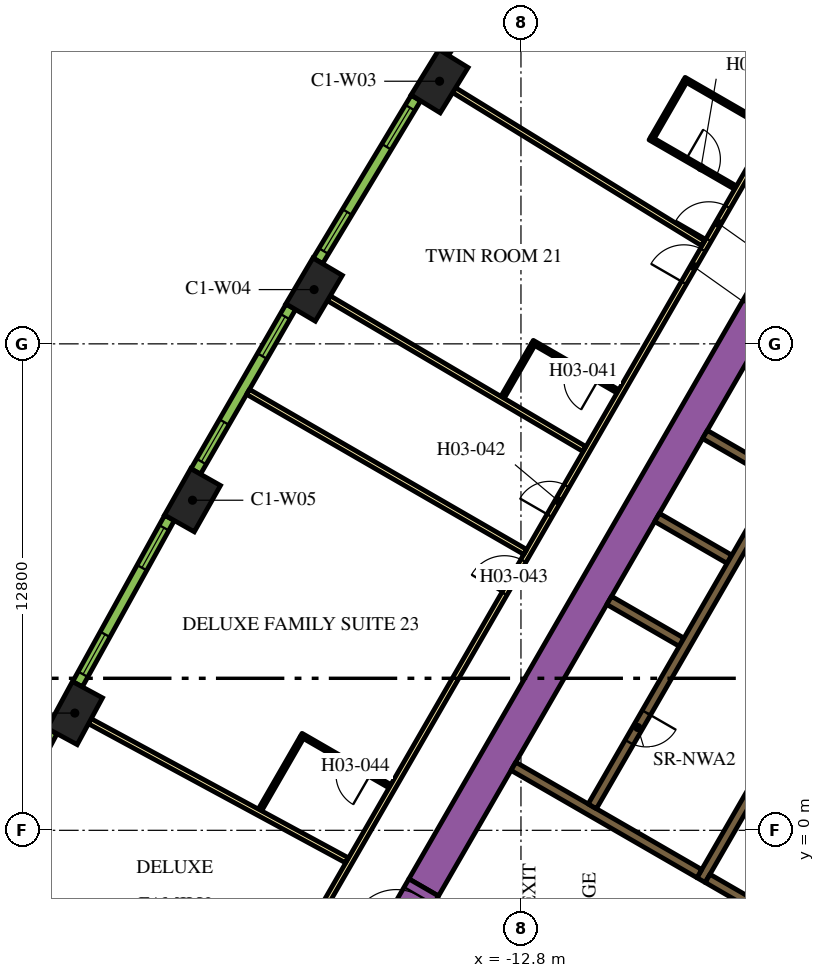
"""IFC4 building model, lengths in metres.
Left out: names, types, materials, properties, quantities, classifications, styles, units other than length and angle.
Written with IfcOpenShell. Run it as: python <this file> out.ifc"""

import sys

from ifc_helpers import new_model, si_unit, direction, frame, frame_2d, origin, origin_2d, place, context, subcontext, project, spatial, rectangle, extrude, element, fill, save


model = new_model("IFC4")
c1 = context("Model", 3, precision=1e-05, world=origin(), true_north=direction((0.0, 1.0)))
c2 = subcontext(c1, "Body", "Model", "MODEL_VIEW")
j1 = project(units=[si_unit("LENGTHUNIT", "METRE"), si_unit("PLANEANGLEUNIT", "RADIAN")], contexts=[c1])
p1 = place(None, origin())
s1 = spatial("IfcSite", under=j1, at=p1, CompositionType="ELEMENT")
p2 = place(p1, origin())
s2 = spatial("IfcBuilding", under=s1, at=p2, CompositionType="ELEMENT")
p3 = place(p2, frame((0.0, 0.0, 51.0)))
s3 = spatial("IfcBuildingStorey", under=s2, at=p3, CompositionType="ELEMENT", Elevation=51.0)
for number, where, z_axis, x_axis in (
    (1, (-14.942, 19.71, 0.0), (0.0, 0.0, 1.0), (-0.524, -0.852, 0.0)),
    (2, (-18.243, 14.228, 0.0), (0.0, 0.0, 1.0), (-0.508, -0.861, 0.0)),
    (3, (-21.443, 8.685, 0.0), (0.0, 0.0, 1.0), (-0.492, -0.871, 0.0)),
    (4, (-24.54, 3.085, 0.0), (0.0, 0.0, 1.0), (-0.476, -0.88, 0.0)),
):
    element("IfcColumn", number, at=place(p3, frame(where, z_axis=z_axis, x_axis=x_axis)), inside=s3, PredefinedType="COLUMN", context=c2, shape_type="SweptSolid", body=[
        extrude(rectangle(XDim=1.4, YDim=0.9, at=origin_2d()), origin(), (0.0, 0.0, 1.0), 3.9),
    ])
p4 = place(p3, frame((-15.36, -1.503, 0.0), z_axis=(0.0, 0.0, 1.0), x_axis=(0.50000389221, 0.866023156604, 0.0)))
e5 = element("IfcWall", 5, at=p4, inside=s3, PredefinedType="SOLIDWALL", context=c2, shape_type="SweptSolid", body=[
    extrude(rectangle(XDim=21.0, YDim=0.9, at=frame_2d((10.5, 0.0))), origin(), (0.0, 0.0, 1.0), 3.9),
])
p5 = place(p3, frame((-8.06, -1.311, 0.0), z_axis=(0.0, 0.0, 1.0), x_axis=(0.50000273126, 0.866023826885, 0.0)))
e6 = element("IfcWall", 6, at=p5, inside=s3, PredefinedType="SOLIDWALL", context=c2, shape_type="SweptSolid", body=[
    extrude(rectangle(XDim=10.33, YDim=0.25, at=frame_2d((5.165, 0.0))), origin(), (0.0, 0.0, 1.0), 3.9),
])
p6 = place(p3, frame((-7.889, -1.265, 0.0), z_axis=(0.0, 0.0, 1.0), x_axis=(0.865986741702, -0.500066958712, 0.0)))
e7 = element("IfcWall", 7, at=p6, inside=s3, PredefinedType="SOLIDWALL", context=c2, shape_type="SweptSolid", body=[
    extrude(rectangle(XDim=1.738, YDim=0.25, at=frame_2d((0.869, 0.0))), origin(), (0.0, 0.0, 1.0), 3.9),
])
p7 = place(p3, frame((-8.106, -1.14, 0.0), z_axis=(0.0, 0.0, 1.0), x_axis=(-0.866000643155, 0.500042884217, 0.0)))
e8 = element("IfcWall", 8, at=p7, inside=s3, PredefinedType="SOLIDWALL", context=c2, shape_type="SweptSolid", body=[
    extrude(rectangle(XDim=5.65, YDim=0.25, at=frame_2d((2.825, 0.0))), origin(), (0.0, 0.0, 1.0), 3.9),
])
for number, where, z_axis, x_axis in (
    (9, (-8.574, 4.95, 0.0), (0.0, 0.0, 1.0), (-0.866, 0.5, 0.0)),
    (10, (-7.314, 7.132, 0.0), (0.0, 0.0, 1.0), (-0.866, 0.5, 0.0)),
):
    element("IfcWall", number, at=place(p3, frame(where, z_axis=z_axis, x_axis=x_axis)), inside=s3, PredefinedType="SOLIDWALL", context=c2, shape_type="SweptSolid", body=[
        extrude(rectangle(XDim=2.2, YDim=0.25, at=frame_2d((1.1, 0.0))), origin(), (0.0, 0.0, 1.0), 3.9),
    ])
p8 = place(p3, frame((-6.296, 9.455, 0.0), z_axis=(0.0, 0.0, 1.0), x_axis=(-0.866011930837, 0.500023335103, 0.0)))
e11 = element("IfcWall", 11, at=p8, inside=s3, PredefinedType="SOLIDWALL", context=c2, shape_type="SweptSolid", body=[
    extrude(rectangle(XDim=1.92, YDim=0.25, at=frame_2d((0.96, 0.0))), origin(), (0.0, 0.0, 1.0), 3.9),
])
p9 = place(p3, frame((-6.008, 9.144, 0.0), z_axis=(0.0, 0.0, 1.0), x_axis=(-0.500006956611, -0.866021387346, 0.0)))
e12 = element("IfcWall", 12, at=p9, inside=s3, PredefinedType="SOLIDWALL", context=c2, shape_type="SweptSolid", body=[
    extrude(rectangle(XDim=9.83, YDim=0.25, at=frame_2d((4.915, 0.0))), origin(), (0.0, 0.0, 1.0), 3.9),
])
p10 = place(p9, frame((6.985, 0.0, 0.0)))
e13 = element("IfcOpeningElement", 13, at=p10, cuts=e12, PredefinedType="OPENING", context=c2, shape_type="SweptSolid", body=[
    extrude(rectangle(XDim=0.9, YDim=2.1, at=frame_2d((0.45, 1.05))), frame((0.0, 0.135, 0.0), z_axis=(0.0, -1.0, 0.0), x_axis=(1.0, 0.0, 0.0)), (0.0, 0.0, 1.0), 0.27),
])
p11 = place(p3, frame((-16.209, -2.976, 0.0), z_axis=(0.0, 0.0, 1.0), x_axis=(0.499954529098, 0.86605165483, 0.0)))
e14 = element("IfcWall", 14, at=p11, inside=s3, PredefinedType="SOLIDWALL", context=c2, shape_type="SweptSolid", body=[
    extrude(rectangle(XDim=1.7, YDim=0.9, at=frame_2d((0.85, 0.0))), origin(), (0.0, 0.0, 1.0), 3.9),
])
p12 = place(p11, frame((0.25, 0.0, 0.0)))
e15 = element("IfcOpeningElement", 15, at=p12, cuts=e14, PredefinedType="OPENING", context=c2, shape_type="SweptSolid", body=[
    extrude(rectangle(XDim=1.2, YDim=2.1, at=frame_2d((0.6, 1.05))), frame((0.0, 0.46, 0.0), z_axis=(0.0, -1.0, 0.0), x_axis=(1.0, 0.0, 0.0)), (0.0, 0.0, 1.0), 0.92),
])
p13 = place(p3, frame((-19.081, -3.9, 0.0), z_axis=(0.0, 0.0, 1.0), x_axis=(0.499998313975, 0.866026377209, 0.0)))
e16 = element("IfcWall", 16, at=p13, inside=s3, PredefinedType="PARTITIONING", context=c2, shape_type="SweptSolid", body=[
    extrude(rectangle(XDim=25.766, YDim=0.15, at=frame_2d((12.883, 0.0))), origin(), (0.0, 0.0, 1.0), 2.75),
])
p14 = place(p13, frame((22.445, 0.0, 0.0)))
e17 = element("IfcOpeningElement", 17, at=p14, cuts=e16, PredefinedType="OPENING", context=c2, shape_type="SweptSolid", body=[
    extrude(rectangle(XDim=1.0, YDim=2.1, at=frame_2d((0.5, 1.05))), frame((0.0, 0.085, 0.0), z_axis=(0.0, -1.0, 0.0), x_axis=(1.0, 0.0, 0.0)), (0.0, 0.0, 1.0), 0.17),
])
p15 = place(p13, frame((21.138, 0.0, 0.0)))
e18 = element("IfcOpeningElement", 18, at=p15, cuts=e16, PredefinedType="OPENING", context=c2, shape_type="SweptSolid", body=[
    extrude(rectangle(XDim=1.0, YDim=2.1, at=frame_2d((0.5, 1.05))), frame((0.0, 0.085, 0.0), z_axis=(0.0, -1.0, 0.0), x_axis=(1.0, 0.0, 0.0)), (0.0, 0.0, 1.0), 0.17),
])
p16 = place(p13, frame((14.066, 0.0, 0.0)))
e19 = element("IfcOpeningElement", 19, at=p16, cuts=e16, PredefinedType="OPENING", context=c2, shape_type="SweptSolid", body=[
    extrude(rectangle(XDim=0.9, YDim=2.1, at=frame_2d((0.45, 1.05))), frame((0.0, 0.085, 0.0), z_axis=(0.0, -1.0, 0.0), x_axis=(1.0, 0.0, 0.0)), (0.0, 0.0, 1.0), 0.17),
])
p17 = place(p13, frame((11.693, 0.0, 0.0)))
e20 = element("IfcOpeningElement", 20, at=p17, cuts=e16, PredefinedType="OPENING", context=c2, shape_type="SweptSolid", body=[
    extrude(rectangle(XDim=1.0, YDim=2.1, at=frame_2d((0.5, 1.05))), frame((0.0, 0.085, 0.0), z_axis=(0.0, -1.0, 0.0), x_axis=(1.0, 0.0, 0.0)), (0.0, 0.0, 1.0), 0.17),
])
p18 = place(p3, frame((-24.145, 2.871, 0.0), z_axis=(0.0, 0.0, 1.0), x_axis=(0.879551725039, -0.475803281809, 0.0)))
e21 = element("IfcWall", 21, at=p18, inside=s3, PredefinedType="PARTITIONING", context=c2, shape_type="SweptSolid", body=[
    extrude(rectangle(XDim=7.688, YDim=0.15, at=frame_2d((3.844, 0.0))), origin(), (0.0, 0.0, 1.0), 2.75),
])
p19 = place(p3, frame((-19.982, 11.537, 0.0), z_axis=(0.0, 0.0, 1.0), x_axis=(0.866020994654, -0.500007636761, 0.0)))
e22 = element("IfcWall", 22, at=p19, inside=s3, PredefinedType="PARTITIONING", context=c2, shape_type="SweptSolid", body=[
    extrude(rectangle(XDim=8.423, YDim=0.15, at=frame_2d((4.211, 0.0))), origin(), (0.0, 0.0, 1.0), 2.75),
])
p20 = place(p3, frame((-17.856, 13.999, 0.0), z_axis=(0.0, 0.0, 1.0), x_axis=(0.861371519381, -0.507975497047, 0.0)))
e23 = element("IfcWall", 23, at=p20, inside=s3, PredefinedType="PARTITIONING", context=c2, shape_type="SweptSolid", body=[
    extrude(rectangle(XDim=7.804, YDim=0.15, at=frame_2d((3.902, 0.0))), origin(), (0.0, 0.0, 1.0), 2.75),
])
p21 = place(p3, frame((-14.558, 19.475, 0.0), z_axis=(0.0, 0.0, 1.0), x_axis=(0.851829455142, -0.523819223925, 0.0)))
e24 = element("IfcWall", 24, at=p21, inside=s3, PredefinedType="PARTITIONING", context=c2, shape_type="SweptSolid", body=[
    extrude(rectangle(XDim=7.688, YDim=0.15, at=frame_2d((3.844, 0.0))), origin(), (0.0, 0.0, 1.0), 2.75),
])
p22 = place(p3, frame((-11.16, 24.888, 0.0), z_axis=(0.0, 0.0, 1.0), x_axis=(0.84199813156, -0.539480441211, 0.0)))
e25 = element("IfcWall", 25, at=p22, inside=s3, PredefinedType="PARTITIONING", context=c2, shape_type="SweptSolid", body=[
    extrude(rectangle(XDim=11.638, YDim=0.15, at=frame_2d((5.819, 0.0))), origin(), (0.0, 0.0, 1.0), 2.75),
])
p23 = place(p3, frame((-9.405, 18.21, 0.0), z_axis=(0.0, 0.0, 1.0), x_axis=(0.865997922154, -0.500047596559, 0.0)))
e26 = element("IfcWall", 26, at=p23, inside=s3, PredefinedType="PARTITIONING", context=c2, shape_type="SweptSolid", body=[
    extrude(rectangle(XDim=2.6, YDim=0.1, at=frame_2d((1.3, 0.0))), origin(), (0.0, 0.0, 1.0), 2.75),
])
p24 = place(p23, frame((1.1, 0.0, 0.0)))
e27 = element("IfcOpeningElement", 27, at=p24, cuts=e26, PredefinedType="OPENING", context=c2, shape_type="SweptSolid", body=[
    extrude(rectangle(XDim=0.9, YDim=2.1, at=frame_2d((0.45, 1.05))), frame((0.0, 0.06, 0.0), z_axis=(0.0, -1.0, 0.0), x_axis=(1.0, 0.0, 0.0)), (0.0, 0.0, 1.0), 0.12),
])
p25 = place(p3, frame((-9.336, 18.229, 0.0), z_axis=(0.0, 0.0, 1.0), x_axis=(0.499954529098, 0.86605165483, 0.0)))
e28 = element("IfcWall", 28, at=p25, inside=s3, PredefinedType="PARTITIONING", context=c2, shape_type="SweptSolid", body=[
    extrude(rectangle(XDim=1.7, YDim=0.1, at=frame_2d((0.85, 0.0))), origin(), (0.0, 0.0, 1.0), 2.75),
])
p26 = place(p3, frame((-6.253, 18.469, 0.0), z_axis=(0.0, 0.0, 1.0), x_axis=(-0.866021400173, 0.500006934395, 0.0)))
e29 = element("IfcWall", 29, at=p26, inside=s3, PredefinedType="PARTITIONING", context=c2, shape_type="SweptSolid", body=[
    extrude(rectangle(XDim=2.6, YDim=0.1, at=frame_2d((1.3, 0.0))), origin(), (0.0, 0.0, 1.0), 2.75),
])
p27 = place(p3, frame((-10.249, 11.549, 0.0), z_axis=(0.0, 0.0, 1.0), x_axis=(-0.866021400173, 0.500006934395, 0.0)))
e30 = element("IfcWall", 30, at=p27, inside=s3, PredefinedType="PARTITIONING", context=c2, shape_type="SweptSolid", body=[
    extrude(rectangle(XDim=2.6, YDim=0.1, at=frame_2d((1.3, 0.0))), origin(), (0.0, 0.0, 1.0), 2.75),
])
p28 = place(p27, frame((0.6, 0.0, 0.0)))
e31 = element("IfcOpeningElement", 31, at=p28, cuts=e30, PredefinedType="OPENING", context=c2, shape_type="SweptSolid", body=[
    extrude(rectangle(XDim=0.9, YDim=2.1, at=frame_2d((0.45, 1.05))), frame((0.0, 0.06, 0.0), z_axis=(0.0, -1.0, 0.0), x_axis=(1.0, 0.0, 0.0)), (0.0, 0.0, 1.0), 0.12),
])
p29 = place(p3, frame((-12.487, 12.772, 0.0), z_axis=(0.0, 0.0, 1.0), x_axis=(-0.500085729368, -0.865975902253, 0.0)))
e32 = element("IfcWall", 32, at=p29, inside=s3, PredefinedType="PARTITIONING", context=c2, shape_type="SweptSolid", body=[
    extrude(rectangle(XDim=1.59, YDim=0.1, at=frame_2d((0.795, 0.0))), origin(), (0.0, 0.0, 1.0), 2.75),
])
p30 = place(p3, frame((-16.247, 1.159, 0.0), z_axis=(0.0, 0.0, 1.0), x_axis=(-0.866059108428, 0.4999416173, 0.0)))
e33 = element("IfcWall", 33, at=p30, inside=s3, PredefinedType="PARTITIONING", context=c2, shape_type="SweptSolid", body=[
    extrude(rectangle(XDim=2.7, YDim=0.1, at=frame_2d((1.35, 0.0))), origin(), (0.0, 0.0, 1.0), 2.75),
])
p31 = place(p30, frame((0.6, 0.0, 0.0)))
e34 = element("IfcOpeningElement", 34, at=p31, cuts=e33, PredefinedType="OPENING", context=c2, shape_type="SweptSolid", body=[
    extrude(rectangle(XDim=0.9, YDim=2.1, at=frame_2d((0.45, 1.05))), frame((0.0, 0.06, 0.0), z_axis=(0.0, -1.0, 0.0), x_axis=(1.0, 0.0, 0.0)), (0.0, 0.0, 1.0), 0.12),
])
p32 = place(p3, frame((-18.567, 2.441, 0.0), z_axis=(0.0, 0.0, 1.0), x_axis=(-0.499946605688, -0.86605622881, 0.0)))
e35 = element("IfcWall", 35, at=p32, inside=s3, PredefinedType="PARTITIONING", context=c2, shape_type="SweptSolid", body=[
    extrude(rectangle(XDim=2.2, YDim=0.1, at=frame_2d((1.1, 0.0))), origin(), (0.0, 0.0, 1.0), 2.75),
])
p33 = place(p3, frame((-12.17, 24.699, 0.0), z_axis=(0.0, 0.0, 1.0), x_axis=(-0.531688286542, -0.846940119462, 0.0)))
e36 = element("IfcWall", 36, at=p33, inside=s3, PredefinedType="SOLIDWALL", context=c2, shape_type="SweptSolid", body=[
    extrude(rectangle(XDim=4.998, YDim=0.29, at=frame_2d((2.499, 0.0))), origin(), (0.0, 0.0, 1.0), 3.65),
])
p34 = place(p33, frame((0.297, 0.0, 0.9)))
e37 = element("IfcOpeningElement", 37, at=p34, cuts=e36, PredefinedType="OPENING", context=c2, shape_type="SweptSolid", body=[
    extrude(rectangle(XDim=1.2, YDim=2.15, at=frame_2d((0.6, 1.075))), frame((0.0, 0.155, 0.0), z_axis=(0.0, -1.0, 0.0), x_axis=(1.0, 0.0, 0.0)), (0.0, 0.0, 1.0), 0.31),
])
p35 = place(p33, frame((3.501, 0.0, 0.9)))
e38 = element("IfcOpeningElement", 38, at=p35, cuts=e36, PredefinedType="OPENING", context=c2, shape_type="SweptSolid", body=[
    extrude(rectangle(XDim=1.2, YDim=2.15, at=frame_2d((0.6, 1.075))), frame((0.0, 0.155, 0.0), z_axis=(0.0, -1.0, 0.0), x_axis=(1.0, 0.0, 0.0)), (0.0, 0.0, 1.0), 0.31),
])
p36 = place(p3, frame((-15.564, 19.267, 0.0), z_axis=(0.0, 0.0, 1.0), x_axis=(-0.515938796285, -0.856625448191, 0.0)))
e39 = element("IfcWall", 39, at=p36, inside=s3, PredefinedType="SOLIDWALL", context=c2, shape_type="SweptSolid", body=[
    extrude(rectangle(XDim=4.998, YDim=0.29, at=frame_2d((2.499, 0.0))), origin(), (0.0, 0.0, 1.0), 3.65),
])
p37 = place(p36, frame((0.297, 0.0, 0.9)))
e40 = element("IfcOpeningElement", 40, at=p37, cuts=e39, PredefinedType="OPENING", context=c2, shape_type="SweptSolid", body=[
    extrude(rectangle(XDim=1.2, YDim=2.15, at=frame_2d((0.6, 1.075))), frame((0.0, 0.155, 0.0), z_axis=(0.0, -1.0, 0.0), x_axis=(1.0, 0.0, 0.0)), (0.0, 0.0, 1.0), 0.31),
])
p38 = place(p36, frame((3.501, 0.0, 0.9)))
e41 = element("IfcOpeningElement", 41, at=p38, cuts=e39, PredefinedType="OPENING", context=c2, shape_type="SweptSolid", body=[
    extrude(rectangle(XDim=1.2, YDim=2.15, at=frame_2d((0.6, 1.075))), frame((0.0, 0.155, 0.0), z_axis=(0.0, -1.0, 0.0), x_axis=(1.0, 0.0, 0.0)), (0.0, 0.0, 1.0), 0.31),
])
p39 = place(p3, frame((-18.858, 13.773, 0.0), z_axis=(0.0, 0.0, 1.0), x_axis=(-0.50002123722, -0.866013142123, 0.0)))
e42 = element("IfcWall", 42, at=p39, inside=s3, PredefinedType="SOLIDWALL", context=c2, shape_type="SweptSolid", body=[
    extrude(rectangle(XDim=4.998, YDim=0.29, at=frame_2d((2.499, 0.0))), origin(), (0.0, 0.0, 1.0), 3.65),
])
p40 = place(p39, frame((0.297, 0.0, 0.9)))
e43 = element("IfcOpeningElement", 43, at=p40, cuts=e42, PredefinedType="OPENING", context=c2, shape_type="SweptSolid", body=[
    extrude(rectangle(XDim=1.2, YDim=2.15, at=frame_2d((0.6, 1.075))), frame((0.0, 0.155, 0.0), z_axis=(0.0, -1.0, 0.0), x_axis=(1.0, 0.0, 0.0)), (0.0, 0.0, 1.0), 0.31),
])
p41 = place(p39, frame((3.501, 0.0, 0.9)))
e44 = element("IfcOpeningElement", 44, at=p41, cuts=e42, PredefinedType="OPENING", context=c2, shape_type="SweptSolid", body=[
    extrude(rectangle(XDim=1.2, YDim=2.15, at=frame_2d((0.6, 1.075))), frame((0.0, 0.155, 0.0), z_axis=(0.0, -1.0, 0.0), x_axis=(1.0, 0.0, 0.0)), (0.0, 0.0, 1.0), 0.31),
])
p42 = place(p3, frame((-22.05, 8.22, 0.0), z_axis=(0.0, 0.0, 1.0), x_axis=(-0.483912572871, -0.875116347589, 0.0)))
e45 = element("IfcWall", 45, at=p42, inside=s3, PredefinedType="SOLIDWALL", context=c2, shape_type="SweptSolid", body=[
    extrude(rectangle(XDim=4.998, YDim=0.29, at=frame_2d((2.499, 0.0))), origin(), (0.0, 0.0, 1.0), 3.65),
])
p43 = place(p42, frame((0.297, 0.0, 0.9)))
e46 = element("IfcOpeningElement", 46, at=p43, cuts=e45, PredefinedType="OPENING", context=c2, shape_type="SweptSolid", body=[
    extrude(rectangle(XDim=1.2, YDim=2.15, at=frame_2d((0.6, 1.075))), frame((0.0, 0.155, 0.0), z_axis=(0.0, -1.0, 0.0), x_axis=(1.0, 0.0, 0.0)), (0.0, 0.0, 1.0), 0.31),
])
p44 = place(p42, frame((3.501, 0.0, 0.9)))
e47 = element("IfcOpeningElement", 47, at=p44, cuts=e45, PredefinedType="OPENING", context=c2, shape_type="SweptSolid", body=[
    extrude(rectangle(XDim=1.2, YDim=2.15, at=frame_2d((0.6, 1.075))), frame((0.0, 0.155, 0.0), z_axis=(0.0, -1.0, 0.0), x_axis=(1.0, 0.0, 0.0)), (0.0, 0.0, 1.0), 0.31),
])
p45 = place(p3, frame((-25.138, 2.608, 0.0), z_axis=(0.0, 0.0, 1.0), x_axis=(-0.467629620899, -0.883924509026, 0.0)))
e48 = element("IfcWall", 48, at=p45, inside=s3, PredefinedType="SOLIDWALL", context=c2, shape_type="SweptSolid", body=[
    extrude(rectangle(XDim=4.998, YDim=0.29, at=frame_2d((2.499, 0.0))), origin(), (0.0, 0.0, 1.0), 3.65),
])
p46 = place(p45, frame((0.297, 0.0, 0.9)))
e49 = element("IfcOpeningElement", 49, at=p46, cuts=e48, PredefinedType="OPENING", context=c2, shape_type="SweptSolid", body=[
    extrude(rectangle(XDim=1.2, YDim=2.15, at=frame_2d((0.6, 1.075))), frame((0.0, 0.155, 0.0), z_axis=(0.0, -1.0, 0.0), x_axis=(1.0, 0.0, 0.0)), (0.0, 0.0, 1.0), 0.31),
])
p47 = place(p45, frame((3.501, 0.0, 0.9)))
e50 = element("IfcOpeningElement", 50, at=p47, cuts=e48, PredefinedType="OPENING", context=c2, shape_type="SweptSolid", body=[
    extrude(rectangle(XDim=1.2, YDim=2.15, at=frame_2d((0.6, 1.075))), frame((0.0, 0.155, 0.0), z_axis=(0.0, -1.0, 0.0), x_axis=(1.0, 0.0, 0.0)), (0.0, 0.0, 1.0), 0.31),
])
p48 = place(p10, origin())
e51 = element("IfcDoor", 51, at=p48, inside=s3, OperationType="SINGLE_SWING_LEFT", PredefinedType="DOOR", context=c2, shape_type="SweptSolid", body=[
    extrude(rectangle(XDim=0.9, YDim=2.1, at=frame_2d((0.45, 1.05))), frame((0.0, 0.025, 0.0), z_axis=(0.0, -1.0, 0.0), x_axis=(1.0, 0.0, 0.0)), (0.0, 0.0, 1.0), 0.05),
])
fill(e13, e51)
p49 = place(p12, origin())
e52 = element("IfcDoor", 52, at=p49, inside=s3, OperationType="SINGLE_SWING_LEFT", PredefinedType="DOOR", context=c2, shape_type="SweptSolid", body=[
    extrude(rectangle(XDim=1.2, YDim=2.1, at=frame_2d((0.6, 1.05))), frame((0.0, 0.025, 0.0), z_axis=(0.0, -1.0, 0.0), x_axis=(1.0, 0.0, 0.0)), (0.0, 0.0, 1.0), 0.05),
])
fill(e15, e52)
p50 = place(p14, origin())
e53 = element("IfcDoor", 53, at=p50, inside=s3, OperationType="SINGLE_SWING_LEFT", PredefinedType="DOOR", context=c2, shape_type="SweptSolid", body=[
    extrude(rectangle(XDim=1.0, YDim=2.1, at=frame_2d((0.5, 1.05))), frame((0.0, 0.025, 0.0), z_axis=(0.0, -1.0, 0.0), x_axis=(1.0, 0.0, 0.0)), (0.0, 0.0, 1.0), 0.05),
])
fill(e17, e53)
p51 = place(p24, origin())
e54 = element("IfcDoor", 54, at=p51, inside=s3, OperationType="SINGLE_SWING_LEFT", PredefinedType="DOOR", context=c2, shape_type="SweptSolid", body=[
    extrude(rectangle(XDim=0.9, YDim=2.1, at=frame_2d((0.45, 1.05))), frame((0.0, 0.025, 0.0), z_axis=(0.0, -1.0, 0.0), x_axis=(1.0, 0.0, 0.0)), (0.0, 0.0, 1.0), 0.05),
])
fill(e27, e54)
p52 = place(p15, origin())
e55 = element("IfcDoor", 55, at=p52, inside=s3, OperationType="SINGLE_SWING_RIGHT", PredefinedType="DOOR", context=c2, shape_type="SweptSolid", body=[
    extrude(rectangle(XDim=1.0, YDim=2.1, at=frame_2d((0.5, 1.05))), frame((0.0, 0.025, 0.0), z_axis=(0.0, -1.0, 0.0), x_axis=(1.0, 0.0, 0.0)), (0.0, 0.0, 1.0), 0.05),
])
fill(e18, e55)
p53 = place(p28, origin())
e56 = element("IfcDoor", 56, at=p53, inside=s3, OperationType="SINGLE_SWING_RIGHT", PredefinedType="DOOR", context=c2, shape_type="SweptSolid", body=[
    extrude(rectangle(XDim=0.9, YDim=2.1, at=frame_2d((0.45, 1.05))), frame((0.0, 0.025, 0.0), z_axis=(0.0, -1.0, 0.0), x_axis=(1.0, 0.0, 0.0)), (0.0, 0.0, 1.0), 0.05),
])
fill(e31, e56)
p54 = place(p16, origin())
e57 = element("IfcDoor", 57, at=p54, inside=s3, OperationType="SINGLE_SWING_RIGHT", PredefinedType="DOOR", context=c2, shape_type="SweptSolid", body=[
    extrude(rectangle(XDim=0.9, YDim=2.1, at=frame_2d((0.45, 1.05))), frame((0.0, 0.025, 0.0), z_axis=(0.0, -1.0, 0.0), x_axis=(1.0, 0.0, 0.0)), (0.0, 0.0, 1.0), 0.05),
])
fill(e19, e57)
p55 = place(p17, origin())
e58 = element("IfcDoor", 58, at=p55, inside=s3, OperationType="SINGLE_SWING_RIGHT", PredefinedType="DOOR", context=c2, shape_type="SweptSolid", body=[
    extrude(rectangle(XDim=1.0, YDim=2.1, at=frame_2d((0.5, 1.05))), frame((0.0, 0.025, 0.0), z_axis=(0.0, -1.0, 0.0), x_axis=(1.0, 0.0, 0.0)), (0.0, 0.0, 1.0), 0.05),
])
fill(e20, e58)
p56 = place(p31, origin())
e59 = element("IfcDoor", 59, at=p56, inside=s3, OperationType="SINGLE_SWING_LEFT", PredefinedType="DOOR", context=c2, shape_type="SweptSolid", body=[
    extrude(rectangle(XDim=0.9, YDim=2.1, at=frame_2d((0.45, 1.05))), frame((0.0, 0.025, 0.0), z_axis=(0.0, -1.0, 0.0), x_axis=(1.0, 0.0, 0.0)), (0.0, 0.0, 1.0), 0.05),
])
fill(e34, e59)
p57 = place(p37, origin())
e60 = element("IfcWindow", 60, at=p57, inside=s3, PartitioningType="DOUBLE_PANEL_VERTICAL", PredefinedType="WINDOW", context=c2, shape_type="SweptSolid", body=[
    extrude(rectangle(XDim=1.2, YDim=2.15, at=frame_2d((0.6, 1.075))), frame((0.0, 0.015, 0.0), z_axis=(0.0, -1.0, 0.0), x_axis=(1.0, 0.0, 0.0)), (0.0, 0.0, 1.0), 0.06),
])
fill(e40, e60)
p58 = place(p38, origin())
e61 = element("IfcWindow", 61, at=p58, inside=s3, PartitioningType="DOUBLE_PANEL_VERTICAL", PredefinedType="WINDOW", context=c2, shape_type="SweptSolid", body=[
    extrude(rectangle(XDim=1.2, YDim=2.15, at=frame_2d((0.6, 1.075))), frame((0.0, 0.015, 0.0), z_axis=(0.0, -1.0, 0.0), x_axis=(1.0, 0.0, 0.0)), (0.0, 0.0, 1.0), 0.06),
])
fill(e41, e61)
p59 = place(p40, origin())
e62 = element("IfcWindow", 62, at=p59, inside=s3, PartitioningType="DOUBLE_PANEL_VERTICAL", PredefinedType="WINDOW", context=c2, shape_type="SweptSolid", body=[
    extrude(rectangle(XDim=1.2, YDim=2.15, at=frame_2d((0.6, 1.075))), frame((0.0, 0.015, 0.0), z_axis=(0.0, -1.0, 0.0), x_axis=(1.0, 0.0, 0.0)), (0.0, 0.0, 1.0), 0.06),
])
fill(e43, e62)
p60 = place(p41, origin())
e63 = element("IfcWindow", 63, at=p60, inside=s3, PartitioningType="DOUBLE_PANEL_VERTICAL", PredefinedType="WINDOW", context=c2, shape_type="SweptSolid", body=[
    extrude(rectangle(XDim=1.2, YDim=2.15, at=frame_2d((0.6, 1.075))), frame((0.0, 0.015, 0.0), z_axis=(0.0, -1.0, 0.0), x_axis=(1.0, 0.0, 0.0)), (0.0, 0.0, 1.0), 0.06),
])
fill(e44, e63)
p61 = place(p43, origin())
e64 = element("IfcWindow", 64, at=p61, inside=s3, PartitioningType="DOUBLE_PANEL_VERTICAL", PredefinedType="WINDOW", context=c2, shape_type="SweptSolid", body=[
    extrude(rectangle(XDim=1.2, YDim=2.15, at=frame_2d((0.6, 1.075))), frame((0.0, 0.015, 0.0), z_axis=(0.0, -1.0, 0.0), x_axis=(1.0, 0.0, 0.0)), (0.0, 0.0, 1.0), 0.06),
])
fill(e46, e64)
p62 = place(p44, origin())
e65 = element("IfcWindow", 65, at=p62, inside=s3, PartitioningType="DOUBLE_PANEL_VERTICAL", PredefinedType="WINDOW", context=c2, shape_type="SweptSolid", body=[
    extrude(rectangle(XDim=1.2, YDim=2.15, at=frame_2d((0.6, 1.075))), frame((0.0, 0.015, 0.0), z_axis=(0.0, -1.0, 0.0), x_axis=(1.0, 0.0, 0.0)), (0.0, 0.0, 1.0), 0.06),
])
fill(e47, e65)
save(model, sys.argv[1])
